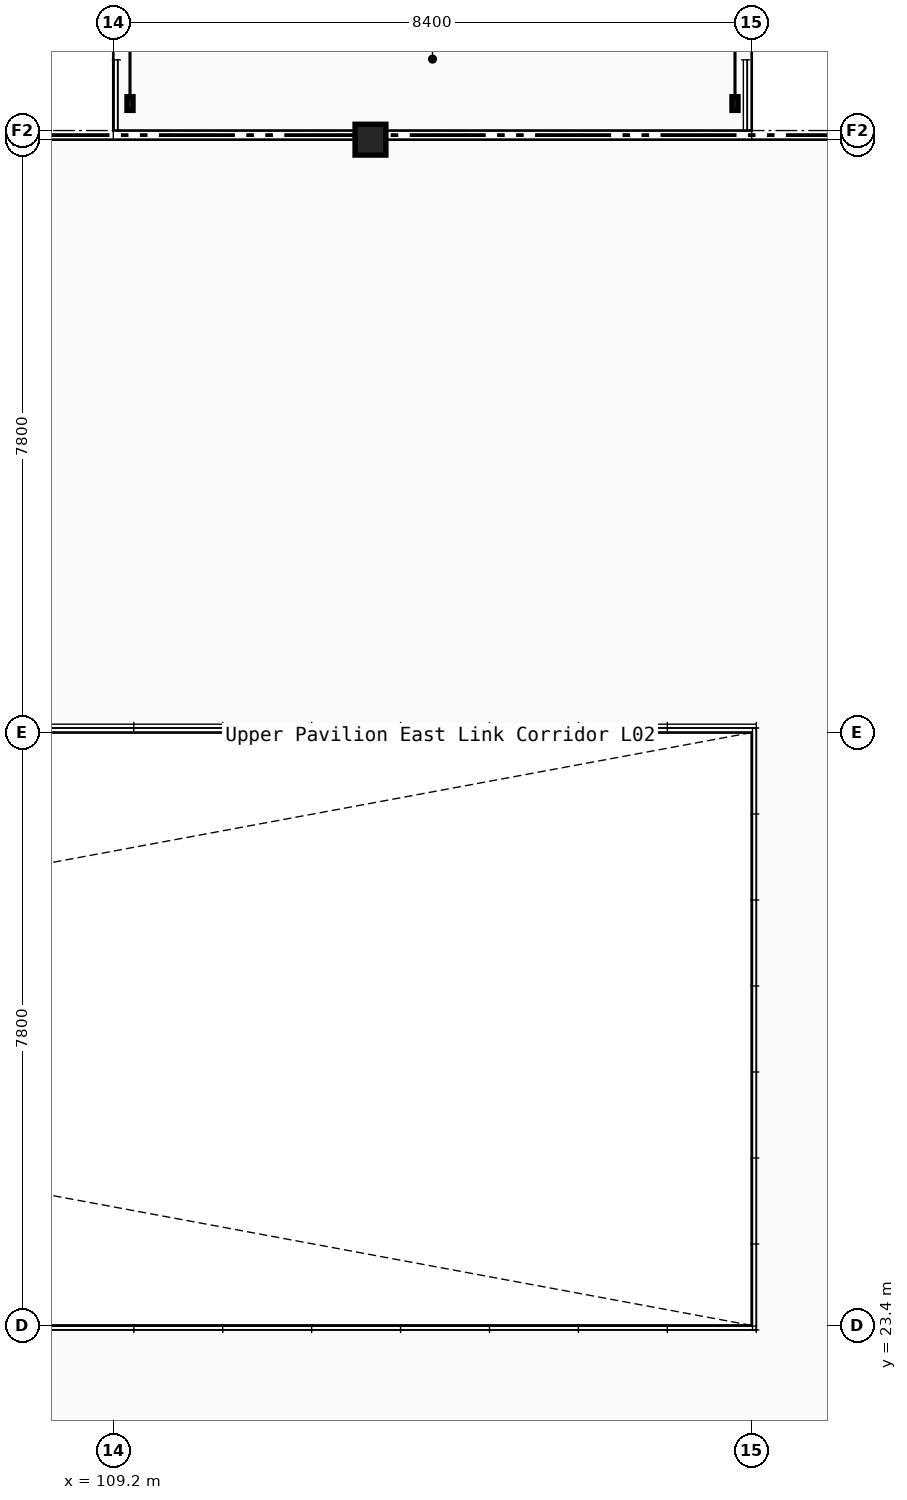
"""IFC4 building model, lengths in metres.
Left out: names, types, materials, properties, quantities, classifications, styles, units other than length and angle.
Written with IfcOpenShell. Run it as: python <this file> out.ifc"""

import sys

from ifc_helpers import new_model, si_unit, direction, frame, origin, origin_2d, place, context, subcontext, project, spatial, hollow_circle, extrude, element, save


model = new_model("IFC4")
c1 = context("Model", 3, precision=1e-05, world=origin(), true_north=direction((0.0, 1.0)))
c2 = subcontext(c1, "Body", "Model", "MODEL_VIEW")
j1 = project(units=[si_unit("LENGTHUNIT", "METRE"), si_unit("PLANEANGLEUNIT", "RADIAN")], contexts=[c1])
p1 = place(None, origin())
s1 = spatial("IfcSite", under=j1, at=p1, CompositionType="ELEMENT")
p2 = place(p1, origin())
s2 = spatial("IfcBuilding", under=s1, at=p2, CompositionType="ELEMENT")
p3 = place(p2, frame((0.0, 0.0, 10.2)))
s3 = spatial("IfcBuildingStorey", under=s2, at=p3, CompositionType="ELEMENT", Elevation=10.2)
p4 = place(p3, frame((112.584, 39.0, 0.0), z_axis=(0.0, 0.0, 1.0), x_axis=(1.0, 0.0, 0.0)))
e1 = element("IfcColumn", 1, at=p4, inside=s3, PredefinedType="COLUMN", context=c2, shape_type="SweptSolid", body=[
    extrude(hollow_circle(Radius=0.203, WallThickness=0.02, at=origin_2d()), origin(), (0.0, 0.0, 1.0), 4.65),
])
save(model, sys.argv[1])
